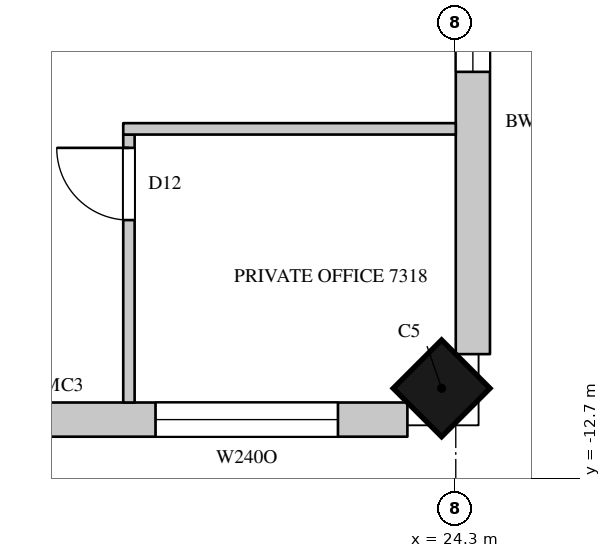
"""IFC4 building model, lengths in metres.
Left out: names, types, materials, properties, quantities, classifications, styles, units other than length and angle.
Written with IfcOpenShell. Run it as: python <this file> out.ifc"""

import sys

from ifc_helpers import new_model, si_unit, direction, frame, frame_2d, origin, origin_2d, place, context, subcontext, project, spatial, rectangle, extrude, element, fill, save


model = new_model("IFC4")
c1 = context("Model", 3, precision=1e-05, world=origin(), true_north=direction((0.0, 1.0)))
c2 = subcontext(c1, "Body", "Model", "MODEL_VIEW")
j1 = project(units=[si_unit("LENGTHUNIT", "METRE"), si_unit("PLANEANGLEUNIT", "RADIAN")], contexts=[c1])
p1 = place(None, origin())
s1 = spatial("IfcSite", under=j1, at=p1, CompositionType="ELEMENT")
p2 = place(p1, origin())
s2 = spatial("IfcBuilding", under=s1, at=p2, CompositionType="ELEMENT")
p3 = place(p2, frame((0.0, 0.0, 321.3)))
s3 = spatial("IfcBuildingStorey", under=s2, at=p3, CompositionType="ELEMENT", Elevation=321.3)
p4 = place(p3, frame((24.114, -11.514, 0.0), z_axis=(0.0, 0.0, 1.0), x_axis=(0.707106781187, 0.707106781187, 0.0)))
e1 = element("IfcColumn", 1, at=p4, inside=s3, PredefinedType="COLUMN", context=c2, shape_type="SweptSolid", body=[
    extrude(rectangle(XDim=0.9, YDim=0.9, at=origin_2d()), origin(), (0.0, 0.0, 1.0), 4.1),
])
p5 = place(p3, frame((18.648, -11.925, 0.0), z_axis=(0.0, 0.0, 1.0), x_axis=(1.0, 0.0, 0.0)))
e2 = element("IfcWall", 2, at=p5, inside=s3, PredefinedType="SOLIDWALL", context=c2, shape_type="SweptSolid", body=[
    extrude(rectangle(XDim=5.015, YDim=0.45, at=frame_2d((2.508, 0.0))), origin(), (0.0, 0.0, 1.0), 3.8),
])
p6 = place(p5, frame((1.702, 0.0, 1.05)))
e3 = element("IfcOpeningElement", 3, at=p6, cuts=e2, PredefinedType="OPENING", context=c2, shape_type="SweptSolid", body=[
    extrude(rectangle(XDim=2.4, YDim=2.4, at=frame_2d((1.2, 1.2))), frame((0.0, 0.235, 0.0), z_axis=(0.0, -1.0, 0.0), x_axis=(1.0, 0.0, 0.0)), (0.0, 0.0, 1.0), 0.47),
])
p7 = place(p3, frame((24.525, -11.064, 0.0), z_axis=(0.0, 0.0, 1.0), x_axis=(0.0, 1.0, 0.0)))
e4 = element("IfcWall", 4, at=p7, inside=s3, PredefinedType="SOLIDWALL", context=c2, shape_type="SweptSolid", body=[
    extrude(rectangle(XDim=6.114, YDim=0.45, at=frame_2d((3.057, 0.0))), origin(), (0.0, 0.0, 1.0), 3.8),
])
p8 = place(p7, frame((3.714, 0.0, 1.05)))
e5 = element("IfcOpeningElement", 5, at=p8, cuts=e4, PredefinedType="OPENING", context=c2, shape_type="SweptSolid", body=[
    extrude(rectangle(XDim=2.1, YDim=2.4, at=frame_2d((1.05, 1.2))), frame((0.0, 0.235, 0.0), z_axis=(0.0, -1.0, 0.0), x_axis=(1.0, 0.0, 0.0)), (0.0, 0.0, 1.0), 0.47),
])
p9 = place(p3, frame((20.0, -11.7, 0.0), z_axis=(0.0, 0.0, 1.0), x_axis=(0.0, 1.0, 0.0)))
e6 = element("IfcWall", 6, at=p9, inside=s3, PredefinedType="PARTITIONING", context=c2, shape_type="SweptSolid", body=[
    extrude(rectangle(XDim=3.525, YDim=0.15, at=frame_2d((1.762, 0.0))), origin(), (0.0, 0.0, 1.0), 3.8),
])
p10 = place(p9, frame((2.4, 0.0, 0.0)))
e7 = element("IfcOpeningElement", 7, at=p10, cuts=e6, PredefinedType="OPENING", context=c2, shape_type="SweptSolid", body=[
    extrude(rectangle(XDim=0.95, YDim=2.2, at=frame_2d((0.475, 1.1))), frame((0.0, 0.085, 0.0), z_axis=(0.0, -1.0, 0.0), x_axis=(1.0, 0.0, 0.0)), (0.0, 0.0, 1.0), 0.17),
])
p11 = place(p3, frame((19.925, -8.1, 0.0), z_axis=(0.0, 0.0, 1.0), x_axis=(1.0, 0.0, 0.0)))
e8 = element("IfcWall", 8, at=p11, inside=s3, PredefinedType="PARTITIONING", context=c2, shape_type="SweptSolid", body=[
    extrude(rectangle(XDim=4.375, YDim=0.15, at=frame_2d((2.188, 0.0))), origin(), (0.0, 0.0, 1.0), 3.15),
])
p12 = place(p8, origin())
e9 = element("IfcWindow", 9, at=p12, inside=s3, PartitioningType="SINGLE_PANEL", PredefinedType="WINDOW", context=c2, shape_type="SweptSolid", body=[
    extrude(rectangle(XDim=2.1, YDim=2.4, at=frame_2d((1.05, 1.2))), frame((0.0, 0.135, 0.0), z_axis=(0.0, -1.0, 0.0), x_axis=(1.0, 0.0, 0.0)), (0.0, 0.0, 1.0), 0.06),
])
fill(e5, e9)
p13 = place(p10, origin())
e10 = element("IfcDoor", 10, at=p13, inside=s3, OperationType="SINGLE_SWING_RIGHT", PredefinedType="DOOR", context=c2, shape_type="SweptSolid", body=[
    extrude(rectangle(XDim=0.95, YDim=2.2, at=frame_2d((0.475, 1.1))), frame((0.0, 0.025, 0.0), z_axis=(0.0, -1.0, 0.0), x_axis=(1.0, 0.0, 0.0)), (0.0, 0.0, 1.0), 0.05),
])
fill(e7, e10)
p14 = place(p6, origin())
e11 = element("IfcWindow", 11, at=p14, inside=s3, PartitioningType="SINGLE_PANEL", PredefinedType="WINDOW", context=c2, shape_type="SweptSolid", body=[
    extrude(rectangle(XDim=2.4, YDim=2.4, at=frame_2d((1.2, 1.2))), frame((0.0, 0.135, 0.0), z_axis=(0.0, -1.0, 0.0), x_axis=(1.0, 0.0, 0.0)), (0.0, 0.0, 1.0), 0.06),
])
fill(e3, e11)
save(model, sys.argv[1])
